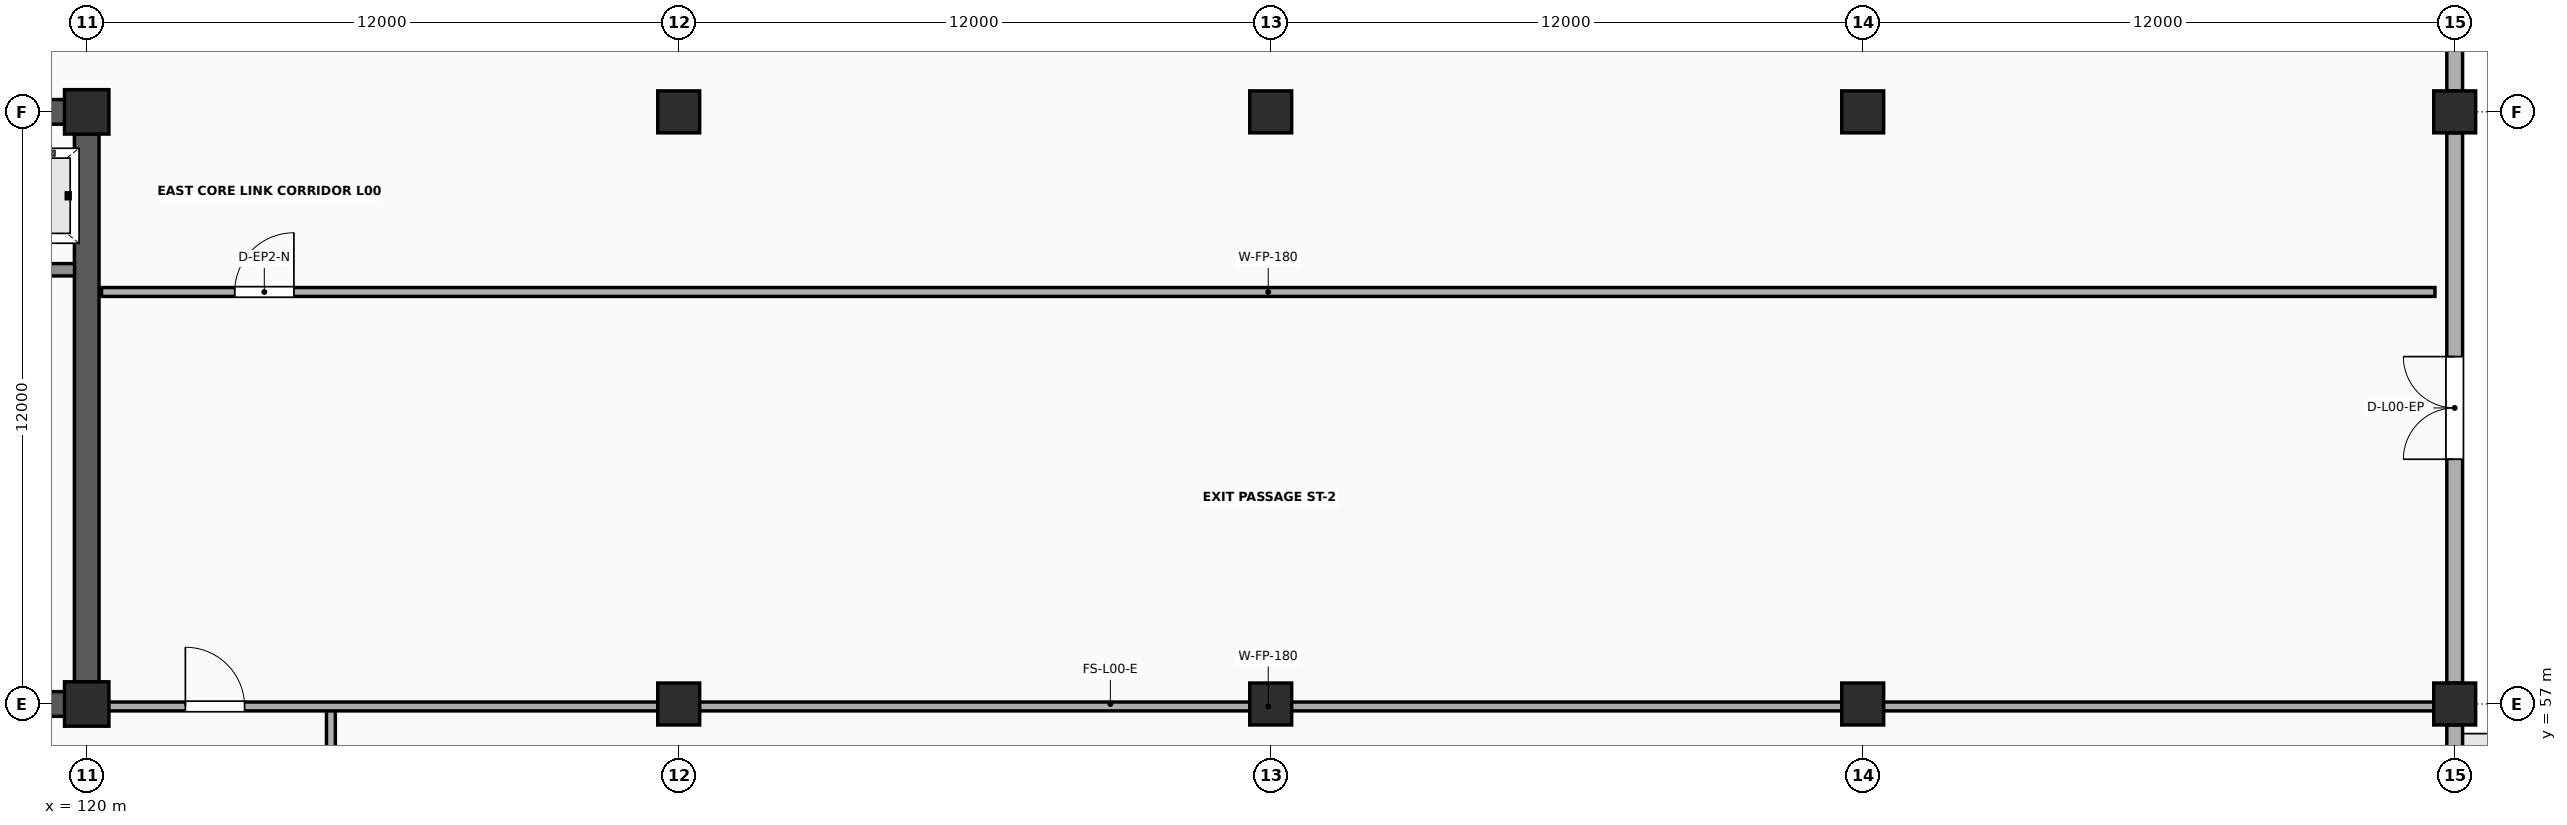
"""IFC4 building model, lengths in metres.
Left out: names, types, materials, properties, quantities, classifications, styles, units other than length and angle.
Written with IfcOpenShell. Run it as: python <this file> out.ifc"""

import sys

from ifc_helpers import new_model, si_unit, direction, frame, frame_2d, origin, origin_2d, place, context, subcontext, project, spatial, rectangle, extrude, element, fill, save


model = new_model("IFC4")
c1 = context("Model", 3, precision=1e-05, world=origin(), true_north=direction((0.0, 1.0)))
c2 = subcontext(c1, "Body", "Model", "MODEL_VIEW")
j1 = project(units=[si_unit("LENGTHUNIT", "METRE"), si_unit("PLANEANGLEUNIT", "RADIAN")], contexts=[c1])
p1 = place(None, origin())
s1 = spatial("IfcSite", under=j1, at=p1, CompositionType="ELEMENT")
p2 = place(p1, origin())
s2 = spatial("IfcBuilding", under=s1, at=p2, CompositionType="ELEMENT")
p3 = place(p2, origin())
s3 = spatial("IfcBuildingStorey", under=s2, at=p3, CompositionType="ELEMENT", Elevation=0.0)
for number, where, z_axis, x_axis in (
    (1, (120.0, 57.0, 0.0), (0.0, 0.0, 1.0), (1.0, 0.0, 0.0)),
    (2, (120.0, 69.0, 0.0), (0.0, 0.0, 1.0), (1.0, 0.0, 0.0)),
):
    element("IfcColumn", number, at=place(p3, frame(where, z_axis=z_axis, x_axis=x_axis)), inside=s3, PredefinedType="COLUMN", context=c2, shape_type="SweptSolid", body=[
        extrude(rectangle(XDim=0.9, YDim=0.9, at=origin_2d()), origin(), (0.0, 0.0, 1.0), 5.4),
    ])
for number, where, z_axis, x_axis in (
    (3, (132.0, 57.0, 0.0), (0.0, 0.0, 1.0), (1.0, 0.0, 0.0)),
    (4, (132.0, 69.0, 0.0), (0.0, 0.0, 1.0), (1.0, 0.0, 0.0)),
    (5, (144.0, 57.0, 0.0), (0.0, 0.0, 1.0), (1.0, 0.0, 0.0)),
    (6, (144.0, 69.0, 0.0), (0.0, 0.0, 1.0), (1.0, 0.0, 0.0)),
    (7, (156.0, 57.0, 0.0), (0.0, 0.0, 1.0), (1.0, 0.0, 0.0)),
    (8, (156.0, 69.0, 0.0), (0.0, 0.0, 1.0), (1.0, 0.0, 0.0)),
    (9, (168.0, 57.0, 0.0), (0.0, 0.0, 1.0), (1.0, 0.0, 0.0)),
    (10, (168.0, 69.0, 0.0), (0.0, 0.0, 1.0), (1.0, 0.0, 0.0)),
):
    element("IfcColumn", number, at=place(p3, frame(where, z_axis=z_axis, x_axis=x_axis)), inside=s3, PredefinedType="COLUMN", context=c2, shape_type="SweptSolid", body=[
        extrude(rectangle(XDim=0.85, YDim=0.85, at=origin_2d()), origin(), (0.0, 0.0, 1.0), 5.4),
    ])
p4 = place(p3, frame((108.447, 57.0, 0.0), z_axis=(0.0, 0.0, 1.0), x_axis=(1.0, 0.0, 0.0)))
e11 = element("IfcWall", 11, at=p4, inside=s3, PredefinedType="SHEAR", context=c2, shape_type="SweptSolid", body=[
    extrude(rectangle(XDim=11.106, YDim=0.5, at=frame_2d((5.553, 0.0))), origin(), (0.0, 0.0, 1.0), 5.203),
])
p5 = place(p4, frame((4.753, 0.0, 0.0)))
e12 = element("IfcOpeningElement", 12, at=p5, cuts=e11, PredefinedType="OPENING", context=c2, shape_type="SweptSolid", body=[
    extrude(rectangle(XDim=1.2, YDim=2.2, at=frame_2d((0.6, 1.1))), frame((0.0, 0.265, 0.0), z_axis=(0.0, -1.0, 0.0), x_axis=(1.0, 0.0, 0.0)), (0.0, 0.0, 1.0), 0.53),
])
p6 = place(p4, frame((8.453, 0.0, 0.0)))
e13 = element("IfcOpeningElement", 13, at=p6, cuts=e11, PredefinedType="OPENING", context=c2, shape_type="SweptSolid", body=[
    extrude(rectangle(XDim=1.5, YDim=2.25, at=frame_2d((0.75, 1.125))), frame((0.0, 0.265, 0.0), z_axis=(0.0, -1.0, 0.0), x_axis=(1.0, 0.0, 0.0)), (0.0, 0.0, 1.0), 0.53),
])
for number, where, z_axis, x_axis in (
    (14, (108.447, 69.0, 0.0), (0.0, 0.0, 1.0), (1.0, 0.0, 0.0)),
    (15, (120.0, 57.447, 0.0), (0.0, 0.0, 1.0), (0.0, 1.0, 0.0)),
):
    element("IfcWall", number, at=place(p3, frame(where, z_axis=z_axis, x_axis=x_axis)), inside=s3, PredefinedType="SHEAR", context=c2, shape_type="SweptSolid", body=[
        extrude(rectangle(XDim=11.106, YDim=0.5, at=frame_2d((5.553, 0.0))), origin(), (0.0, 0.0, 1.0), 5.203),
    ])
p7 = place(p3, frame((112.597, 65.8, 0.0), z_axis=(0.0, 0.0, 1.0), x_axis=(1.0, 0.0, 0.0)))
e16 = element("IfcWall", 16, at=p7, inside=s3, PredefinedType="SOLIDWALL", context=c2, shape_type="SweptSolid", body=[
    extrude(rectangle(XDim=7.156, YDim=0.25, at=frame_2d((3.578, 0.0))), origin(), (0.0, 0.0, 1.0), 5.203),
])
p8 = place(p7, frame((0.653, 0.0, 0.0)))
e17 = element("IfcOpeningElement", 17, at=p8, cuts=e16, PredefinedType="OPENING", context=c2, shape_type="SweptSolid", body=[
    extrude(rectangle(XDim=1.1, YDim=2.24, at=frame_2d((0.55, 1.12))), frame((0.0, 0.14, 0.0), z_axis=(0.0, -1.0, 0.0), x_axis=(1.0, 0.0, 0.0)), (0.0, 0.0, 1.0), 0.28),
])
p9 = place(p7, frame((3.153, 0.0, 0.0)))
e18 = element("IfcOpeningElement", 18, at=p9, cuts=e16, PredefinedType="OPENING", context=c2, shape_type="SweptSolid", body=[
    extrude(rectangle(XDim=1.05, YDim=2.2, at=frame_2d((0.525, 1.1))), frame((0.0, 0.14, 0.0), z_axis=(0.0, -1.0, 0.0), x_axis=(1.0, 0.0, 0.0)), (0.0, 0.0, 1.0), 0.28),
])
p10 = place(p7, frame((5.528, 0.0, 0.0)))
e19 = element("IfcOpeningElement", 19, at=p10, cuts=e16, PredefinedType="OPENING", context=c2, shape_type="SweptSolid", body=[
    extrude(rectangle(XDim=1.05, YDim=2.2, at=frame_2d((0.525, 1.1))), frame((0.0, 0.14, 0.0), z_axis=(0.0, -1.0, 0.0), x_axis=(1.0, 0.0, 0.0)), (0.0, 0.0, 1.0), 0.28),
])
p11 = place(p3, frame((168.0, 45.423, 0.0), z_axis=(0.0, 0.0, 1.0), x_axis=(0.0, 1.0, 0.0)))
e20 = element("IfcWall", 20, at=p11, inside=s3, PredefinedType="SOLIDWALL", context=c2, shape_type="SweptSolid", body=[
    extrude(rectangle(XDim=11.154, YDim=0.32, at=frame_2d((5.577, 0.0))), origin(), (0.0, 0.0, 1.0), 3.85),
])
p12 = place(p11, frame((2.577, 0.0, 0.0)))
e21 = element("IfcOpeningElement", 21, at=p12, cuts=e20, PredefinedType="OPENING", context=c2, shape_type="SweptSolid", body=[
    extrude(rectangle(XDim=6.0, YDim=3.2, at=frame_2d((3.0, 1.6))), frame((0.0, 0.175, 0.0), z_axis=(0.0, -1.0, 0.0), x_axis=(1.0, 0.0, 0.0)), (0.0, 0.0, 1.0), 0.35),
])
p13 = place(p3, frame((168.0, 57.423, 0.0), z_axis=(0.0, 0.0, 1.0), x_axis=(0.0, 1.0, 0.0)))
e22 = element("IfcWall", 22, at=p13, inside=s3, PredefinedType="SOLIDWALL", context=c2, shape_type="SweptSolid", body=[
    extrude(rectangle(XDim=11.154, YDim=0.32, at=frame_2d((5.577, 0.0))), origin(), (0.0, 0.0, 1.0), 3.85),
])
p14 = place(p13, frame((4.537, 0.0, 0.0)))
e23 = element("IfcOpeningElement", 23, at=p14, cuts=e22, PredefinedType="OPENING", context=c2, shape_type="SweptSolid", body=[
    extrude(rectangle(XDim=2.08, YDim=2.44, at=frame_2d((1.04, 1.22))), frame((0.0, 0.175, 0.0), z_axis=(0.0, -1.0, 0.0), x_axis=(1.0, 0.0, 0.0)), (0.0, 0.0, 1.0), 0.35),
])
p15 = place(p3, frame((168.0, 69.423, 0.0), z_axis=(0.0, 0.0, 1.0), x_axis=(0.0, 1.0, 0.0)))
e24 = element("IfcWall", 24, at=p15, inside=s3, PredefinedType="SOLIDWALL", context=c2, shape_type="SweptSolid", body=[
    extrude(rectangle(XDim=8.104, YDim=0.32, at=frame_2d((4.052, 0.0))), origin(), (0.0, 0.0, 1.0), 3.85),
])
p16 = place(p15, frame((2.892, 0.0, 0.55)))
e25 = element("IfcOpeningElement", 25, at=p16, cuts=e24, PredefinedType="OPENING", context=c2, shape_type="SweptSolid", body=[
    extrude(rectangle(XDim=2.32, YDim=1.42, at=frame_2d((1.16, 0.71))), frame((0.0, 0.175, 0.0), z_axis=(0.0, -1.0, 0.0), x_axis=(1.0, 0.0, 0.0)), (0.0, 0.0, 1.0), 0.35),
])
p17 = place(p3, frame((124.95, 52.5, 0.0), z_axis=(0.0, 0.0, 1.0), x_axis=(0.0, 1.0, 0.0)))
e26 = element("IfcWall", 26, at=p17, inside=s3, PredefinedType="SOLIDWALL", context=c2, shape_type="SweptSolid", body=[
    extrude(rectangle(XDim=4.45, YDim=0.18, at=frame_2d((2.225, 0.0))), origin(), (0.0, 0.0, 1.0), 2.6),
])
p18 = place(p3, frame((120.3, 56.95, 0.0), z_axis=(0.0, 0.0, 1.0), x_axis=(1.0, 0.0, 0.0)))
e27 = element("IfcWall", 27, at=p18, inside=s3, PredefinedType="SOLIDWALL", context=c2, shape_type="SweptSolid", body=[
    extrude(rectangle(XDim=47.3, YDim=0.18, at=frame_2d((23.65, 0.0))), origin(), (0.0, 0.0, 1.0), 2.6),
])
p19 = place(p18, frame((1.7, 0.0, 0.0)))
e28 = element("IfcOpeningElement", 28, at=p19, cuts=e27, PredefinedType="OPENING", context=c2, shape_type="SweptSolid", body=[
    extrude(rectangle(XDim=1.2, YDim=2.2, at=frame_2d((0.6, 1.1))), frame((0.0, 0.105, 0.0), z_axis=(0.0, -1.0, 0.0), x_axis=(1.0, 0.0, 0.0)), (0.0, 0.0, 1.0), 0.21),
])
p20 = place(p3, frame((120.3, 65.35, 0.0), z_axis=(0.0, 0.0, 1.0), x_axis=(1.0, 0.0, 0.0)))
e29 = element("IfcWall", 29, at=p20, inside=s3, PredefinedType="SOLIDWALL", context=c2, shape_type="SweptSolid", body=[
    extrude(rectangle(XDim=47.3, YDim=0.18, at=frame_2d((23.65, 0.0))), origin(), (0.0, 0.0, 1.0), 2.6),
])
p21 = place(p20, frame((2.7, 0.0, 0.0)))
e30 = element("IfcOpeningElement", 30, at=p21, cuts=e29, PredefinedType="OPENING", context=c2, shape_type="SweptSolid", body=[
    extrude(rectangle(XDim=1.2, YDim=2.2, at=frame_2d((0.6, 1.1))), frame((0.0, 0.105, 0.0), z_axis=(0.0, -1.0, 0.0), x_axis=(1.0, 0.0, 0.0)), (0.0, 0.0, 1.0), 0.21),
])
p22 = place(p14, frame((2.08, 0.0, 0.0), z_axis=(0.0, 0.0, 1.0), x_axis=(-1.0, 0.0, 0.0)))
e31 = element("IfcDoor", 31, at=p22, inside=s3, OperationType="DOUBLE_DOOR_SINGLE_SWING", PredefinedType="DOOR", context=c2, shape_type="SweptSolid", body=[
    extrude(rectangle(XDim=2.08, YDim=2.44, at=frame_2d((1.04, 1.22))), frame((0.0, 0.025, 0.0), z_axis=(0.0, -1.0, 0.0), x_axis=(1.0, 0.0, 0.0)), (0.0, 0.0, 1.0), 0.05),
])
fill(e23, e31)
p23 = place(p19, origin())
e32 = element("IfcDoor", 32, at=p23, inside=s3, OperationType="SINGLE_SWING_LEFT", PredefinedType="DOOR", context=c2, shape_type="SweptSolid", body=[
    extrude(rectangle(XDim=1.2, YDim=2.2, at=frame_2d((0.6, 1.1))), frame((0.0, 0.025, 0.0), z_axis=(0.0, -1.0, 0.0), x_axis=(1.0, 0.0, 0.0)), (0.0, 0.0, 1.0), 0.05),
])
fill(e28, e32)
p24 = place(p21, frame((1.2, 0.0, 0.0), z_axis=(0.0, 0.0, 1.0), x_axis=(-1.0, 0.0, 0.0)))
e33 = element("IfcDoor", 33, at=p24, inside=s3, OperationType="SINGLE_SWING_RIGHT", PredefinedType="DOOR", context=c2, shape_type="SweptSolid", body=[
    extrude(rectangle(XDim=1.2, YDim=2.2, at=frame_2d((0.6, 1.1))), frame((0.0, 0.025, 0.0), z_axis=(0.0, -1.0, 0.0), x_axis=(1.0, 0.0, 0.0)), (0.0, 0.0, 1.0), 0.05),
])
fill(e30, e33)
save(model, sys.argv[1])
